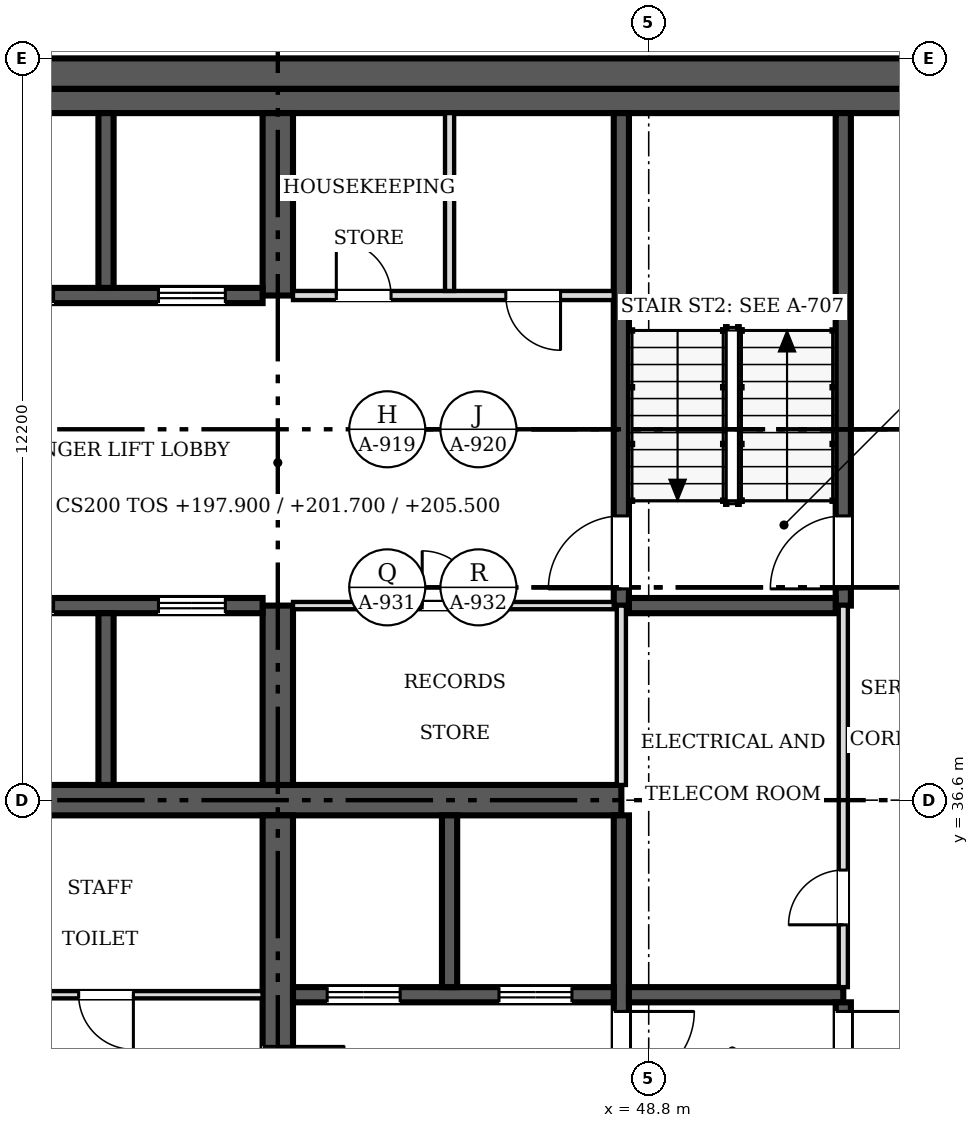
"""IFC4 building model, lengths in metres.
Left out: names, types, materials, properties, quantities, classifications, styles, units other than length and angle.
Written with IfcOpenShell. Run it as: python <this file> out.ifc"""

import sys

from ifc_helpers import new_model, si_unit, direction, frame, frame_2d, origin, place, context, subcontext, project, spatial, rectangle, extrude, source, transform, mapped, element, fill, save


model = new_model("IFC4")
c1 = context("Model", 3, precision=1e-05, world=origin(), true_north=direction((0.0, 1.0)))
c2 = subcontext(c1, "Body", "Model", "MODEL_VIEW")
j1 = project(units=[si_unit("LENGTHUNIT", "METRE"), si_unit("PLANEANGLEUNIT", "RADIAN")], contexts=[c1])
p1 = place(None, origin())
s1 = spatial("IfcSite", under=j1, at=p1, CompositionType="ELEMENT")
p2 = place(p1, origin())
s2 = spatial("IfcBuilding", under=s1, at=p2, CompositionType="ELEMENT")
p3 = place(p2, frame((0.0, 0.0, 197.9)))
s3 = spatial("IfcBuildingStorey", under=s2, at=p3, CompositionType="ELEMENT", Elevation=197.9)
p4 = place(p3, frame((30.5, 48.55, 0.0), z_axis=(0.0, 0.0, 1.0), x_axis=(1.0, 0.0, 0.0)))
e1 = element("IfcWall", 1, at=p4, inside=s3, PredefinedType="SHEAR", context=c2, shape_type="SweptSolid", body=[
    extrude(rectangle(XDim=24.4, YDim=0.5, at=frame_2d((12.2, 0.0))), origin(), (0.0, 0.0, 1.0), 3.8),
])
p5 = place(p3, frame((31.0, 48.1, 0.0), z_axis=(0.0, 0.0, 1.0), x_axis=(1.0, 0.0, 0.0)))
e2 = element("IfcWall", 2, at=p5, inside=s3, PredefinedType="SOLIDWALL", context=c2, shape_type="SweptSolid", body=[
    extrude(rectangle(XDim=23.4, YDim=0.4, at=frame_2d((11.7, 0.0))), origin(), (0.0, 0.0, 1.0), 3.8),
])
p6 = place(p3, frame((31.4, 36.6, 0.0), z_axis=(0.0, 0.0, 1.0), x_axis=(1.0, 0.0, 0.0)))
e3 = element("IfcWall", 3, at=p6, inside=s3, PredefinedType="SHEAR", context=c2, shape_type="SweptSolid", body=[
    extrude(rectangle(XDim=16.95, YDim=0.5, at=frame_2d((8.475, 0.0))), origin(), (0.0, 0.0, 1.0), 3.8),
])
p7 = place(p3, frame((42.7, 36.35, 0.0), z_axis=(0.0, 0.0, 1.0), x_axis=(0.0, -1.0, 0.0)))
e4 = element("IfcWall", 4, at=p7, inside=s3, PredefinedType="SHEAR", context=c2, shape_type="SweptSolid", body=[
    extrude(rectangle(XDim=11.05, YDim=0.5, at=frame_2d((5.525, 0.0))), origin(), (0.0, 0.0, 1.0), 3.8),
])
m1 = source(origin(), c2, "Body", "SweptSolid", [
    extrude(rectangle(XDim=0.9, YDim=2.1, at=frame_2d((0.45, 1.05))), frame((0.0, 0.26, 0.0), z_axis=(0.0, -1.0, 0.0), x_axis=(1.0, 0.0, 0.0)), (0.0, 0.0, 1.0), 0.52),
])
p8 = place(p7, frame((6.5, 0.0, 0.0)))
e5 = element("IfcOpeningElement", 5, at=p8, cuts=e4, PredefinedType="OPENING", context=c2, shape_type="MappedRepresentation", body=[
    mapped(m1, transform((0.0, 0.0, 0.0), scale=1.0)),
])
m2 = source(origin(), c2, "Body", "SweptSolid", [
    extrude(rectangle(XDim=1.1, YDim=2.1, at=frame_2d((0.55, 1.05))), frame((0.0, 0.26, 0.0), z_axis=(0.0, -1.0, 0.0), x_axis=(1.0, 0.0, 0.0)), (0.0, 0.0, 1.0), 0.52),
])
p9 = place(p7, frame((3.8, 0.0, 0.0)))
e6 = element("IfcOpeningElement", 6, at=p9, cuts=e4, PredefinedType="OPENING", context=c2, shape_type="MappedRepresentation", body=[
    mapped(m2, transform((0.0, 0.0, 0.0), scale=1.0)),
])
p10 = place(p3, frame((42.7, 36.85, 0.0), z_axis=(0.0, 0.0, 1.0), x_axis=(0.0, 1.0, 0.0)))
e7 = element("IfcWall", 7, at=p10, inside=s3, PredefinedType="SHEAR", context=c2, shape_type="SweptSolid", body=[
    extrude(rectangle(XDim=2.95, YDim=0.5, at=frame_2d((1.475, 0.0))), origin(), (0.0, 0.0, 1.0), 3.8),
])
p11 = place(p3, frame((42.7, 44.9, 0.0), z_axis=(0.0, 0.0, 1.0), x_axis=(0.0, 1.0, 0.0)))
e8 = element("IfcWall", 8, at=p11, inside=s3, PredefinedType="SHEAR", context=c2, shape_type="SweptSolid", body=[
    extrude(rectangle(XDim=3.0, YDim=0.5, at=frame_2d((1.5, 0.0))), origin(), (0.0, 0.0, 1.0), 3.8),
])
p12 = place(p3, frame((31.4, 39.8, 0.0), z_axis=(0.0, 0.0, 1.0), x_axis=(1.0, 0.0, 0.0)))
e9 = element("IfcWall", 9, at=p12, inside=s3, PredefinedType="SOLIDWALL", context=c2, shape_type="SweptSolid", body=[
    extrude(rectangle(XDim=11.05, YDim=0.25, at=frame_2d((5.525, 0.0))), origin(), (0.0, 0.0, 1.0), 3.8),
])
m3 = source(origin(), c2, "Body", "SweptSolid", [
    extrude(rectangle(XDim=1.1, YDim=2.1, at=frame_2d((0.55, 1.05))), frame((0.0, 0.135, 0.0), z_axis=(0.0, -1.0, 0.0), x_axis=(1.0, 0.0, 0.0)), (0.0, 0.0, 1.0), 0.27),
])
p13 = place(p12, frame((0.863, 0.0, 0.0)))
e10 = element("IfcOpeningElement", 10, at=p13, cuts=e9, PredefinedType="OPENING", context=c2, shape_type="MappedRepresentation", body=[
    mapped(m3, transform((0.0, 0.0, 0.0), scale=1.0)),
])
p14 = place(p12, frame((3.688, 0.0, 0.0)))
e11 = element("IfcOpeningElement", 11, at=p14, cuts=e9, PredefinedType="OPENING", context=c2, shape_type="MappedRepresentation", body=[
    mapped(m3, transform((0.0, 0.0, 0.0), scale=1.0)),
])
p15 = place(p12, frame((6.512, 0.0, 0.0)))
e12 = element("IfcOpeningElement", 12, at=p15, cuts=e9, PredefinedType="OPENING", context=c2, shape_type="MappedRepresentation", body=[
    mapped(m3, transform((0.0, 0.0, 0.0), scale=1.0)),
])
p16 = place(p12, frame((9.337, 0.0, 0.0)))
e13 = element("IfcOpeningElement", 13, at=p16, cuts=e9, PredefinedType="OPENING", context=c2, shape_type="MappedRepresentation", body=[
    mapped(m3, transform((0.0, 0.0, 0.0), scale=1.0)),
])
p17 = place(p3, frame((42.45, 44.9, 0.0), z_axis=(0.0, 0.0, 1.0), x_axis=(-1.0, 0.0, 0.0)))
e14 = element("IfcWall", 14, at=p17, inside=s3, PredefinedType="SOLIDWALL", context=c2, shape_type="SweptSolid", body=[
    extrude(rectangle(XDim=11.05, YDim=0.25, at=frame_2d((5.525, 0.0))), origin(), (0.0, 0.0, 1.0), 3.8),
])
p18 = place(p17, frame((9.087, 0.0, 0.0)))
e15 = element("IfcOpeningElement", 15, at=p18, cuts=e14, PredefinedType="OPENING", context=c2, shape_type="MappedRepresentation", body=[
    mapped(m3, transform((0.0, 0.0, 0.0), scale=1.0)),
])
p19 = place(p17, frame((6.262, 0.0, 0.0)))
e16 = element("IfcOpeningElement", 16, at=p19, cuts=e14, PredefinedType="OPENING", context=c2, shape_type="MappedRepresentation", body=[
    mapped(m3, transform((0.0, 0.0, 0.0), scale=1.0)),
])
p20 = place(p17, frame((3.438, 0.0, 0.0)))
e17 = element("IfcOpeningElement", 17, at=p20, cuts=e14, PredefinedType="OPENING", context=c2, shape_type="MappedRepresentation", body=[
    mapped(m3, transform((0.0, 0.0, 0.0), scale=1.0)),
])
p21 = place(p17, frame((0.613, 0.0, 0.0)))
e18 = element("IfcOpeningElement", 18, at=p21, cuts=e14, PredefinedType="OPENING", context=c2, shape_type="MappedRepresentation", body=[
    mapped(m3, transform((0.0, 0.0, 0.0), scale=1.0)),
])
p22 = place(p3, frame((48.35, 36.35, 0.0), z_axis=(0.0, 0.0, 1.0), x_axis=(0.0, -1.0, 0.0)))
e19 = element("IfcWall", 19, at=p22, inside=s3, PredefinedType="SOLIDWALL", context=c2, shape_type="SweptSolid", body=[
    extrude(rectangle(XDim=11.05, YDim=0.25, at=frame_2d((5.525, 0.0))), origin(), (0.0, 0.0, 1.0), 3.8),
])
m4 = source(origin(), c2, "Body", "SweptSolid", [
    extrude(rectangle(XDim=1.2, YDim=2.1, at=frame_2d((0.6, 1.05))), frame((0.0, 0.135, 0.0), z_axis=(0.0, -1.0, 0.0), x_axis=(1.0, 0.0, 0.0)), (0.0, 0.0, 1.0), 0.27),
])
p23 = place(p22, frame((3.225, 0.0, 0.0)))
e20 = element("IfcOpeningElement", 20, at=p23, cuts=e19, PredefinedType="OPENING", context=c2, shape_type="MappedRepresentation", body=[
    mapped(m4, transform((0.0, 0.0, 0.0), scale=1.0)),
])
p24 = place(p3, frame((48.225, 33.4, 0.0), z_axis=(0.0, 0.0, 1.0), x_axis=(-1.0, 0.0, 0.0)))
e21 = element("IfcWall", 21, at=p24, inside=s3, PredefinedType="SOLIDWALL", context=c2, shape_type="SweptSolid", body=[
    extrude(rectangle(XDim=5.275, YDim=0.25, at=frame_2d((2.638, 0.0))), origin(), (0.0, 0.0, 1.0), 3.8),
])
p25 = place(p24, frame((3.512, 0.0, 0.0)))
e22 = element("IfcOpeningElement", 22, at=p25, cuts=e21, PredefinedType="OPENING", context=c2, shape_type="MappedRepresentation", body=[
    mapped(m4, transform((0.0, 0.0, 0.0), scale=1.0)),
])
p26 = place(p24, frame((0.688, 0.0, 0.0)))
e23 = element("IfcOpeningElement", 23, at=p26, cuts=e21, PredefinedType="OPENING", context=c2, shape_type="MappedRepresentation", body=[
    mapped(m4, transform((0.0, 0.0, 0.0), scale=1.0)),
])
p27 = place(p3, frame((48.475, 33.4, 0.0), z_axis=(0.0, 0.0, 1.0), x_axis=(1.0, 0.0, 0.0)))
e24 = element("IfcWall", 24, at=p27, inside=s3, PredefinedType="SOLIDWALL", context=c2, shape_type="SweptSolid", body=[
    extrude(rectangle(XDim=3.525, YDim=0.25, at=frame_2d((1.762, 0.0))), origin(), (0.0, 0.0, 1.0), 3.8),
])
p28 = place(p3, frame((48.35, 47.9, 0.0), z_axis=(0.0, 0.0, 1.0), x_axis=(0.0, -1.0, 0.0)))
e25 = element("IfcWall", 25, at=p28, inside=s3, PredefinedType="SOLIDWALL", context=c2, shape_type="SweptSolid", body=[
    extrude(rectangle(XDim=8.1, YDim=0.25, at=frame_2d((4.05, 0.0))), origin(), (0.0, 0.0, 1.0), 3.8),
])
p29 = place(p28, frame((6.625, 0.0, 0.0)))
e26 = element("IfcOpeningElement", 26, at=p29, cuts=e25, PredefinedType="OPENING", context=c2, shape_type="MappedRepresentation", body=[
    mapped(m4, transform((0.0, 0.0, 0.0), scale=1.0)),
])
p30 = place(p3, frame((52.0, 25.3, 0.0), z_axis=(0.0, 0.0, 1.0), x_axis=(0.0, 1.0, 0.0)))
e27 = element("IfcWall", 27, at=p30, inside=s3, PredefinedType="SOLIDWALL", context=c2, shape_type="SweptSolid", body=[
    extrude(rectangle(XDim=7.975, YDim=0.25, at=frame_2d((3.987, 0.0))), origin(), (0.0, 0.0, 1.0), 3.8),
])
p31 = place(p30, frame((6.625, 0.0, 0.0)))
e28 = element("IfcOpeningElement", 28, at=p31, cuts=e27, PredefinedType="OPENING", context=c2, shape_type="MappedRepresentation", body=[
    mapped(m4, transform((0.0, 0.0, 0.0), scale=1.0)),
])
p32 = place(p3, frame((52.0, 39.8, 0.0), z_axis=(0.0, 0.0, 1.0), x_axis=(0.0, 1.0, 0.0)))
e29 = element("IfcWall", 29, at=p32, inside=s3, PredefinedType="SOLIDWALL", context=c2, shape_type="SweptSolid", body=[
    extrude(rectangle(XDim=8.1, YDim=0.25, at=frame_2d((4.05, 0.0))), origin(), (0.0, 0.0, 1.0), 3.8),
])
p33 = place(p32, frame((0.275, 0.0, 0.0)))
e30 = element("IfcOpeningElement", 30, at=p33, cuts=e29, PredefinedType="OPENING", context=c2, shape_type="MappedRepresentation", body=[
    mapped(m4, transform((0.0, 0.0, 0.0), scale=1.0)),
])
p34 = place(p3, frame((48.475, 39.8, 0.0), z_axis=(0.0, 0.0, 1.0), x_axis=(1.0, 0.0, 0.0)))
e31 = element("IfcWall", 31, at=p34, inside=s3, PredefinedType="SOLIDWALL", context=c2, shape_type="SweptSolid", body=[
    extrude(rectangle(XDim=3.4, YDim=0.25, at=frame_2d((1.7, 0.0))), origin(), (0.0, 0.0, 1.0), 3.8),
])
p35 = place(p3, frame((39.875, 36.85, 0.0), z_axis=(0.0, 0.0, 1.0), x_axis=(0.0, 1.0, 0.0)))
e32 = element("IfcWall", 32, at=p35, inside=s3, PredefinedType="SOLIDWALL", context=c2, shape_type="SweptSolid", body=[
    extrude(rectangle(XDim=2.825, YDim=0.25, at=frame_2d((1.413, 0.0))), origin(), (0.0, 0.0, 1.0), 3.8),
])
p36 = place(p3, frame((45.525, 33.525, 0.0), z_axis=(0.0, 0.0, 1.0), x_axis=(0.0, 1.0, 0.0)))
e33 = element("IfcWall", 33, at=p36, inside=s3, PredefinedType="SOLIDWALL", context=c2, shape_type="SweptSolid", body=[
    extrude(rectangle(XDim=2.825, YDim=0.25, at=frame_2d((1.413, 0.0))), origin(), (0.0, 0.0, 1.0), 3.8),
])
p37 = place(p3, frame((39.875, 45.025, 0.0), z_axis=(0.0, 0.0, 1.0), x_axis=(0.0, 1.0, 0.0)))
e34 = element("IfcWall", 34, at=p37, inside=s3, PredefinedType="SOLIDWALL", context=c2, shape_type="SweptSolid", body=[
    extrude(rectangle(XDim=2.875, YDim=0.25, at=frame_2d((1.438, 0.0))), origin(), (0.0, 0.0, 1.0), 3.8),
])
p38 = place(p3, frame((31.4, 33.4, 0.0), z_axis=(0.0, 0.0, 1.0), x_axis=(1.0, 0.0, 0.0)))
e35 = element("IfcWall", 35, at=p38, inside=s3, PredefinedType="PARTITIONING", context=c2, shape_type="SweptSolid", body=[
    extrude(rectangle(XDim=11.05, YDim=0.12, at=frame_2d((5.525, 0.0))), origin(), (0.0, 0.0, 1.0), 3.6),
])
m5 = source(origin(), c2, "Body", "SweptSolid", [
    extrude(rectangle(XDim=0.9, YDim=2.1, at=frame_2d((0.45, 1.05))), frame((0.0, 0.07, 0.0), z_axis=(0.0, -1.0, 0.0), x_axis=(1.0, 0.0, 0.0)), (0.0, 0.0, 1.0), 0.14),
])
p39 = place(p38, frame((2.375, 0.0, 0.0)))
e36 = element("IfcOpeningElement", 36, at=p39, cuts=e35, PredefinedType="OPENING", context=c2, shape_type="MappedRepresentation", body=[
    mapped(m5, transform((0.0, 0.0, 0.0), scale=1.0)),
])
p40 = place(p38, frame((8.025, 0.0, 0.0)))
e37 = element("IfcOpeningElement", 37, at=p40, cuts=e35, PredefinedType="OPENING", context=c2, shape_type="MappedRepresentation", body=[
    mapped(m5, transform((0.0, 0.0, 0.0), scale=1.0)),
])
p41 = place(p3, frame((52.0, 33.525, 0.0), z_axis=(0.0, 0.0, 1.0), x_axis=(0.0, 1.0, 0.0)))
e38 = element("IfcWall", 38, at=p41, inside=s3, PredefinedType="PARTITIONING", context=c2, shape_type="SweptSolid", body=[
    extrude(rectangle(XDim=6.275, YDim=0.15, at=frame_2d((3.138, 0.0))), origin(), (0.0, 0.0, 1.0), 3.6),
])
m6 = source(origin(), c2, "Body", "SweptSolid", [
    extrude(rectangle(XDim=0.9, YDim=2.1, at=frame_2d((0.45, 1.05))), frame((0.0, 0.085, 0.0), z_axis=(0.0, -1.0, 0.0), x_axis=(1.0, 0.0, 0.0)), (0.0, 0.0, 1.0), 0.17),
])
p42 = place(p41, frame((1.025, 0.0, 0.0)))
e39 = element("IfcOpeningElement", 39, at=p42, cuts=e38, PredefinedType="OPENING", context=c2, shape_type="MappedRepresentation", body=[
    mapped(m6, transform((0.0, 0.0, 0.0), scale=1.0)),
])
p43 = place(p3, frame((48.225, 39.8, 0.0), z_axis=(0.0, 0.0, 1.0), x_axis=(-1.0, 0.0, 0.0)))
e40 = element("IfcWall", 40, at=p43, inside=s3, PredefinedType="PARTITIONING", context=c2, shape_type="SweptSolid", body=[
    extrude(rectangle(XDim=5.275, YDim=0.12, at=frame_2d((2.638, 0.0))), origin(), (0.0, 0.0, 1.0), 3.6),
])
p44 = place(p43, frame((2.25, 0.0, 0.0)))
e41 = element("IfcOpeningElement", 41, at=p44, cuts=e40, PredefinedType="OPENING", context=c2, shape_type="MappedRepresentation", body=[
    mapped(m5, transform((0.0, 0.0, 0.0), scale=1.0)),
])
p45 = place(p3, frame((42.95, 44.9, 0.0), z_axis=(0.0, 0.0, 1.0), x_axis=(1.0, 0.0, 0.0)))
e42 = element("IfcWall", 42, at=p45, inside=s3, PredefinedType="PARTITIONING", context=c2, shape_type="SweptSolid", body=[
    extrude(rectangle(XDim=5.275, YDim=0.15, at=frame_2d((2.638, 0.0))), origin(), (0.0, 0.0, 1.0), 3.6),
])
p46 = place(p45, frame((0.712, 0.0, 0.0)))
e43 = element("IfcOpeningElement", 43, at=p46, cuts=e42, PredefinedType="OPENING", context=c2, shape_type="MappedRepresentation", body=[
    mapped(m6, transform((0.0, 0.0, 0.0), scale=1.0)),
])
p47 = place(p45, frame((3.5, 0.0, 0.0)))
e44 = element("IfcOpeningElement", 44, at=p47, cuts=e42, PredefinedType="OPENING", context=c2, shape_type="MappedRepresentation", body=[
    mapped(m6, transform((0.0, 0.0, 0.0), scale=1.0)),
])
p48 = place(p3, frame((48.35, 36.85, 0.0), z_axis=(0.0, 0.0, 1.0), x_axis=(0.0, 1.0, 0.0)))
e45 = element("IfcWall", 45, at=p48, inside=s3, PredefinedType="PARTITIONING", context=c2, shape_type="SweptSolid", body=[
    extrude(rectangle(XDim=2.95, YDim=0.15, at=frame_2d((1.475, 0.0))), origin(), (0.0, 0.0, 1.0), 3.6),
])
p49 = place(p3, frame((45.525, 44.975, 0.0), z_axis=(0.0, 0.0, 1.0), x_axis=(0.0, 1.0, 0.0)))
e46 = element("IfcWall", 46, at=p49, inside=s3, PredefinedType="PARTITIONING", context=c2, shape_type="SweptSolid", body=[
    extrude(rectangle(XDim=2.925, YDim=0.15, at=frame_2d((1.462, 0.0))), origin(), (0.0, 0.0, 1.0), 3.6),
])
m7 = source(origin(), c2, "Body", "SweptSolid", [
    extrude(rectangle(XDim=1.1, YDim=2.1, at=frame_2d((0.55, 1.05))), frame((0.0, 0.025, 0.0), z_axis=(0.0, -1.0, 0.0), x_axis=(1.0, 0.0, 0.0)), (0.0, 0.0, 1.0), 0.05),
])
p50 = place(p9, origin())
e47 = element("IfcDoor", 47, at=p50, inside=s3, OperationType="SINGLE_SWING_LEFT", PredefinedType="DOOR", context=c2, shape_type="MappedRepresentation", body=[
    mapped(m7, transform((0.0, 0.0, 0.0), scale=1.0)),
])
fill(e6, e47)
p51 = place(p15, origin())
e48 = element("IfcDoor", 48, at=p51, inside=s3, OperationType="DOUBLE_DOOR_SLIDING", PredefinedType="DOOR", context=c2, shape_type="MappedRepresentation", body=[
    mapped(m7, transform((0.0, 0.0, 0.0), scale=1.0)),
])
fill(e12, e48)
p52 = place(p16, origin())
e49 = element("IfcDoor", 49, at=p52, inside=s3, OperationType="DOUBLE_DOOR_SLIDING", PredefinedType="DOOR", context=c2, shape_type="MappedRepresentation", body=[
    mapped(m7, transform((0.0, 0.0, 0.0), scale=1.0)),
])
fill(e13, e49)
p53 = place(p20, origin())
e50 = element("IfcDoor", 50, at=p53, inside=s3, OperationType="DOUBLE_DOOR_SLIDING", PredefinedType="DOOR", context=c2, shape_type="MappedRepresentation", body=[
    mapped(m7, transform((0.0, 0.0, 0.0), scale=1.0)),
])
fill(e17, e50)
p54 = place(p21, origin())
e51 = element("IfcDoor", 51, at=p54, inside=s3, OperationType="DOUBLE_DOOR_SLIDING", PredefinedType="DOOR", context=c2, shape_type="MappedRepresentation", body=[
    mapped(m7, transform((0.0, 0.0, 0.0), scale=1.0)),
])
fill(e18, e51)
m8 = source(origin(), c2, "Body", "SweptSolid", [
    extrude(rectangle(XDim=1.2, YDim=2.1, at=frame_2d((0.6, 1.05))), frame((0.0, 0.025, 0.0), z_axis=(0.0, -1.0, 0.0), x_axis=(1.0, 0.0, 0.0)), (0.0, 0.0, 1.0), 0.05),
])
p55 = place(p23, origin())
e52 = element("IfcDoor", 52, at=p55, inside=s3, OperationType="SINGLE_SWING_LEFT", PredefinedType="DOOR", context=c2, shape_type="MappedRepresentation", body=[
    mapped(m8, transform((0.0, 0.0, 0.0), scale=1.0)),
])
fill(e20, e52)
p56 = place(p25, origin())
e53 = element("IfcDoor", 53, at=p56, inside=s3, OperationType="DOUBLE_DOOR_SLIDING", PredefinedType="DOOR", context=c2, shape_type="MappedRepresentation", body=[
    mapped(m8, transform((0.0, 0.0, 0.0), scale=1.0)),
])
fill(e22, e53)
p57 = place(p26, origin())
e54 = element("IfcDoor", 54, at=p57, inside=s3, OperationType="DOUBLE_DOOR_SLIDING", PredefinedType="DOOR", context=c2, shape_type="MappedRepresentation", body=[
    mapped(m8, transform((0.0, 0.0, 0.0), scale=1.0)),
])
fill(e23, e54)
p58 = place(p29, origin())
e55 = element("IfcDoor", 55, at=p58, inside=s3, OperationType="SINGLE_SWING_RIGHT", PredefinedType="DOOR", context=c2, shape_type="MappedRepresentation", body=[
    mapped(m8, transform((0.0, 0.0, 0.0), scale=1.0)),
])
fill(e26, e55)
p59 = place(p31, origin())
e56 = element("IfcDoor", 56, at=p59, inside=s3, OperationType="SINGLE_SWING_RIGHT", PredefinedType="DOOR", context=c2, shape_type="MappedRepresentation", body=[
    mapped(m8, transform((0.0, 0.0, 0.0), scale=1.0)),
])
fill(e28, e56)
p60 = place(p33, origin())
e57 = element("IfcDoor", 57, at=p60, inside=s3, OperationType="SINGLE_SWING_LEFT", PredefinedType="DOOR", context=c2, shape_type="MappedRepresentation", body=[
    mapped(m8, transform((0.0, 0.0, 0.0), scale=1.0)),
])
fill(e30, e57)
m9 = source(origin(), c2, "Body", "SweptSolid", [
    extrude(rectangle(XDim=0.9, YDim=2.1, at=frame_2d((0.45, 1.05))), frame((0.0, 0.025, 0.0), z_axis=(0.0, -1.0, 0.0), x_axis=(1.0, 0.0, 0.0)), (0.0, 0.0, 1.0), 0.05),
])
p61 = place(p40, origin())
e58 = element("IfcDoor", 58, at=p61, inside=s3, OperationType="SINGLE_SWING_RIGHT", PredefinedType="DOOR", context=c2, shape_type="MappedRepresentation", body=[
    mapped(m9, transform((0.0, 0.0, 0.0), scale=1.0)),
])
fill(e37, e58)
p62 = place(p42, origin())
e59 = element("IfcDoor", 59, at=p62, inside=s3, OperationType="SINGLE_SWING_LEFT", PredefinedType="DOOR", context=c2, shape_type="MappedRepresentation", body=[
    mapped(m9, transform((0.0, 0.0, 0.0), scale=1.0)),
])
fill(e39, e59)
p63 = place(p44, origin())
e60 = element("IfcDoor", 60, at=p63, inside=s3, OperationType="SINGLE_SWING_RIGHT", PredefinedType="DOOR", context=c2, shape_type="MappedRepresentation", body=[
    mapped(m9, transform((0.0, 0.0, 0.0), scale=1.0)),
])
fill(e41, e60)
p64 = place(p46, origin())
e61 = element("IfcDoor", 61, at=p64, inside=s3, OperationType="SINGLE_SWING_LEFT", PredefinedType="DOOR", context=c2, shape_type="MappedRepresentation", body=[
    mapped(m9, transform((0.0, 0.0, 0.0), scale=1.0)),
])
fill(e43, e61)
p65 = place(p47, origin())
e62 = element("IfcDoor", 62, at=p65, inside=s3, OperationType="SINGLE_SWING_RIGHT", PredefinedType="DOOR", context=c2, shape_type="MappedRepresentation", body=[
    mapped(m9, transform((0.0, 0.0, 0.0), scale=1.0)),
])
fill(e44, e62)
save(model, sys.argv[1])
